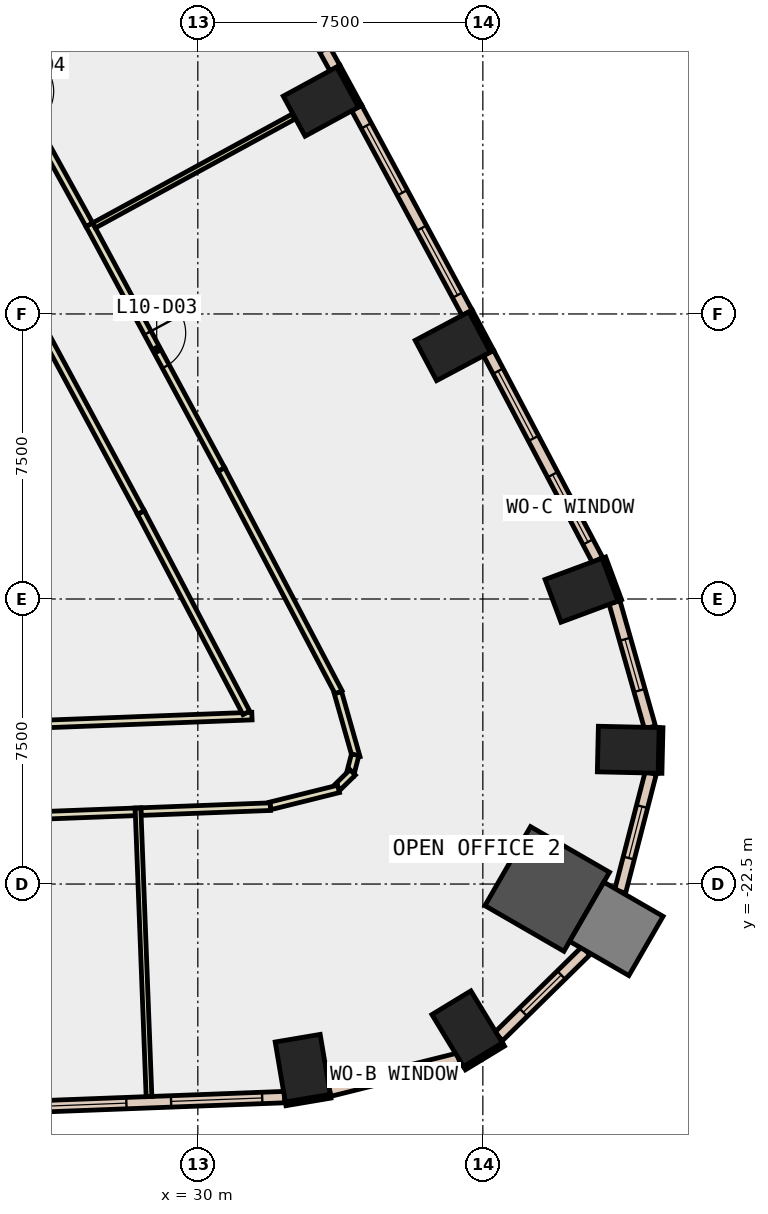
"""IFC4 building model, lengths in metres.
Left out: names, types, materials, properties, quantities, classifications, styles, units other than length and angle.
Written with IfcOpenShell. Run it as: python <this file> out.ifc"""

import sys

from ifc_helpers import new_model, si_unit, direction, frame, frame_2d, origin, origin_2d, place, context, subcontext, project, spatial, rectangle, extrude, element, fill, save


model = new_model("IFC4")
c1 = context("Model", 3, precision=1e-05, world=origin(), true_north=direction((0.0, 1.0)))
c2 = subcontext(c1, "Body", "Model", "MODEL_VIEW")
j1 = project(units=[si_unit("LENGTHUNIT", "METRE"), si_unit("PLANEANGLEUNIT", "RADIAN")], contexts=[c1])
p1 = place(None, origin())
s1 = spatial("IfcSite", under=j1, at=p1, CompositionType="ELEMENT")
p2 = place(p1, origin())
s2 = spatial("IfcBuilding", under=s1, at=p2, CompositionType="ELEMENT")
p3 = place(p2, frame((0.0, 0.0, 51.8)))
s3 = spatial("IfcBuildingStorey", under=s2, at=p3, CompositionType="ELEMENT", Elevation=51.8)
for number, where, z_axis, x_axis in (
    (1, (32.761, -27.345, -0.4), (0.0, 0.0, 1.0), (0.986, 0.167, 0.0)),
    (2, (37.088, -26.307, -0.4), (0.0, 0.0, 1.0), (0.855, 0.519, 0.0)),
):
    element("IfcColumn", number, at=place(p3, frame(where, z_axis=z_axis, x_axis=x_axis)), inside=s3, PredefinedType="COLUMN", context=c2, shape_type="SweptSolid", body=[
        extrude(rectangle(XDim=1.2, YDim=1.6, at=origin_2d()), origin(), (0.0, 0.0, 1.0), 4.2),
    ])
p4 = place(p3, frame((39.194, -22.629, -0.4), z_axis=(0.0, 0.0, 1.0), x_axis=(-0.866025403784, 0.5, 0.0)))
e3 = element("IfcColumn", 3, at=p4, inside=s3, PredefinedType="COLUMN", context=c2, shape_type="SweptSolid", body=[
    extrude(rectangle(XDim=2.4, YDim=2.4, at=origin_2d()), origin(), (0.0, 0.0, 1.0), 4.2),
])
for number, where, z_axis, x_axis in (
    (4, (41.326, -18.966, -0.4), (0.0, 0.0, 1.0), (0.023, 1.0, 0.0)),
    (5, (40.097, -14.77, -0.4), (0.0, 0.0, 1.0), (-0.348, 0.937, 0.0)),
    (6, (36.708, -8.349, -0.4), (0.0, 0.0, 1.0), (-0.469, 0.883, 0.0)),
    (7, (33.238, -1.913, -0.4), (0.0, 0.0, 1.0), (-0.478, 0.878, 0.0)),
):
    element("IfcColumn", number, at=place(p3, frame(where, z_axis=z_axis, x_axis=x_axis)), inside=s3, PredefinedType="COLUMN", context=c2, shape_type="SweptSolid", body=[
        extrude(rectangle(XDim=1.2, YDim=1.6, at=origin_2d()), origin(), (0.0, 0.0, 1.0), 4.2),
    ])
p5 = place(p3, frame((41.013, -23.679, -0.4), z_axis=(0.0, 0.0, 1.0), x_axis=(-0.866025403784, 0.5, 0.0)))
e8 = element("IfcColumn", 8, at=p5, inside=s3, PredefinedType="COLUMN", context=c2, shape_type="SweptSolid", body=[
    extrude(rectangle(XDim=1.8, YDim=1.8, at=origin_2d()), origin(), (0.0, 0.0, 1.0), 4.2),
])
p6 = place(p3, frame((41.103, -15.037, 0.0), z_axis=(0.0, 0.0, 1.0), x_axis=(-0.348268249601, 0.937394914814, 0.0)))
e9 = element("IfcWall", 9, at=p6, inside=s3, PredefinedType="STANDARD", context=c2, shape_type="SweptSolid", body=[
    extrude(rectangle(XDim=1.2, YDim=0.1, at=frame_2d((0.6, 0.0))), origin(), (0.0, 0.0, 1.0), 3.8),
])
p7 = place(p3, frame((37.74, -8.48, 0.0), z_axis=(0.0, 0.0, 1.0), x_axis=(-0.469383408131, 0.882994459876, 0.0)))
e10 = element("IfcWall", 10, at=p7, inside=s3, PredefinedType="STANDARD", context=c2, shape_type="SweptSolid", body=[
    extrude(rectangle(XDim=1.199, YDim=0.1, at=frame_2d((0.6, 0.0))), origin(), (0.0, 0.0, 1.0), 3.8),
])
p8 = place(p3, frame((34.271, -2.034, 0.0), z_axis=(0.0, 0.0, 1.0), x_axis=(-0.478267644701, 0.878214131082, 0.0)))
e11 = element("IfcWall", 11, at=p8, inside=s3, PredefinedType="STANDARD", context=c2, shape_type="SweptSolid", body=[
    extrude(rectangle(XDim=1.2, YDim=0.1, at=frame_2d((0.6, 0.0))), origin(), (0.0, 0.0, 1.0), 3.8),
])
p9 = place(p3, frame((32.311, -28.283, 0.0), z_axis=(0.0, 0.0, 1.0), x_axis=(0.986011774526, 0.166675674579, 0.0)))
e12 = element("IfcWall", 12, at=p9, inside=s3, PredefinedType="STANDARD", context=c2, shape_type="SweptSolid", body=[
    extrude(rectangle(XDim=1.2, YDim=0.1, at=frame_2d((0.6, 0.0))), origin(), (0.0, 0.0, 1.0), 3.8),
])
for number, where, z_axis, x_axis in (
    (13, (37.016, -27.345, 0.0), (0.0, 0.0, 1.0), (0.855, 0.519, 0.0)),
    (14, (42.162, -19.585, 0.0), (0.0, 0.0, 1.0), (0.023, 1.0, 0.0)),
):
    element("IfcWall", number, at=place(p3, frame(where, z_axis=z_axis, x_axis=x_axis)), inside=s3, PredefinedType="STANDARD", context=c2, shape_type="SweptSolid", body=[
        extrude(rectangle(XDim=1.2, YDim=0.1, at=frame_2d((0.6, 0.0))), origin(), (0.0, 0.0, 1.0), 3.8),
    ])
p10 = place(p3, frame((25.134, -28.378, 0.0), z_axis=(0.0, 0.0, 1.0), x_axis=(0.999276920032, 0.038021534562, 0.0)))
e15 = element("IfcWall", 15, at=p10, inside=s3, PredefinedType="STANDARD", context=c2, shape_type="SweptSolid", body=[
    extrude(rectangle(XDim=7.153, YDim=0.3, at=frame_2d((3.577, 0.0))), origin(), (0.0, 0.0, 1.0), 3.8),
])
p11 = place(p10, frame((0.588, 0.0, 0.9)))
e16 = element("IfcOpeningElement", 16, at=p11, cuts=e15, PredefinedType="OPENING", context=c2, shape_type="SweptSolid", body=[
    extrude(rectangle(XDim=2.4, YDim=2.6, at=frame_2d((1.2, 1.3))), frame((0.0, 0.16, 0.0), z_axis=(0.0, -1.0, 0.0), x_axis=(1.0, 0.0, 0.0)), (0.0, 0.0, 1.0), 0.32),
])
p12 = place(p10, frame((4.165, 0.0, 0.9)))
e17 = element("IfcOpeningElement", 17, at=p12, cuts=e15, PredefinedType="OPENING", context=c2, shape_type="SweptSolid", body=[
    extrude(rectangle(XDim=2.4, YDim=2.6, at=frame_2d((1.2, 1.3))), frame((0.0, 0.16, 0.0), z_axis=(0.0, -1.0, 0.0), x_axis=(1.0, 0.0, 0.0)), (0.0, 0.0, 1.0), 0.32),
])
p13 = place(p3, frame((33.469, -27.939, 0.0), z_axis=(0.0, 0.0, 1.0), x_axis=(0.970331016871, 0.241780308749, 0.0)))
e18 = element("IfcWall", 18, at=p13, inside=s3, PredefinedType="STANDARD", context=c2, shape_type="SweptSolid", body=[
    extrude(rectangle(XDim=3.499, YDim=0.3, at=frame_2d((1.75, 0.0))), origin(), (0.0, 0.0, 1.0), 3.8),
])
p14 = place(p13, frame((1.049, 0.0, 0.9)))
e19 = element("IfcOpeningElement", 19, at=p14, cuts=e18, PredefinedType="OPENING", context=c2, shape_type="SweptSolid", body=[
    extrude(rectangle(XDim=1.4, YDim=2.6, at=frame_2d((0.7, 1.3))), frame((0.0, 0.16, 0.0), z_axis=(0.0, -1.0, 0.0), x_axis=(1.0, 0.0, 0.0)), (0.0, 0.0, 1.0), 0.32),
])
p15 = place(p3, frame((37.914, -26.513, 0.0), z_axis=(0.0, 0.0, 1.0), x_axis=(0.71340487189, 0.700752087948, 0.0)))
e20 = element("IfcWall", 20, at=p15, inside=s3, PredefinedType="STANDARD", context=c2, shape_type="SweptSolid", body=[
    extrude(rectangle(XDim=3.222, YDim=0.3, at=frame_2d((1.611, 0.0))), origin(), (0.0, 0.0, 1.0), 3.8),
])
p16 = place(p15, frame((0.911, 0.0, 0.9)))
e21 = element("IfcOpeningElement", 21, at=p16, cuts=e20, PredefinedType="OPENING", context=c2, shape_type="SweptSolid", body=[
    extrude(rectangle(XDim=1.4, YDim=2.6, at=frame_2d((0.7, 1.3))), frame((0.0, 0.16, 0.0), z_axis=(0.0, -1.0, 0.0), x_axis=(1.0, 0.0, 0.0)), (0.0, 0.0, 1.0), 0.32),
])
p17 = place(p3, frame((41.112, -22.698, 0.0), z_axis=(0.0, 0.0, 1.0), x_axis=(0.250086521833, 0.968223492587, 0.0)))
e22 = element("IfcWall", 22, at=p17, inside=s3, PredefinedType="STANDARD", context=c2, shape_type="SweptSolid", body=[
    extrude(rectangle(XDim=3.222, YDim=0.3, at=frame_2d((1.611, 0.0))), origin(), (0.0, 0.0, 1.0), 3.8),
])
p18 = place(p17, frame((0.911, 0.0, 0.9)))
e23 = element("IfcOpeningElement", 23, at=p18, cuts=e22, PredefinedType="OPENING", context=c2, shape_type="SweptSolid", body=[
    extrude(rectangle(XDim=1.4, YDim=2.6, at=frame_2d((0.7, 1.3))), frame((0.0, 0.16, 0.0), z_axis=(0.0, -1.0, 0.0), x_axis=(1.0, 0.0, 0.0)), (0.0, 0.0, 1.0), 0.32),
])
p19 = place(p3, frame((41.898, -18.379, 0.0), z_axis=(0.0, 0.0, 1.0), x_axis=(-0.272901963142, 0.962041848629, 0.0)))
e24 = element("IfcWall", 24, at=p19, inside=s3, PredefinedType="STANDARD", context=c2, shape_type="SweptSolid", body=[
    extrude(rectangle(XDim=3.422, YDim=0.3, at=frame_2d((1.711, 0.0))), origin(), (0.0, 0.0, 1.0), 3.8),
])
p20 = place(p19, frame((1.011, 0.0, 0.9)))
e25 = element("IfcOpeningElement", 25, at=p20, cuts=e24, PredefinedType="OPENING", context=c2, shape_type="SweptSolid", body=[
    extrude(rectangle(XDim=1.4, YDim=2.6, at=frame_2d((0.7, 1.3))), frame((0.0, 0.16, 0.0), z_axis=(0.0, -1.0, 0.0), x_axis=(1.0, 0.0, 0.0)), (0.0, 0.0, 1.0), 0.32),
])
p21 = place(p3, frame((40.518, -13.975, 0.0), z_axis=(0.0, 0.0, 1.0), x_axis=(-0.465847756605, 0.884864886673, 0.0)))
e26 = element("IfcWall", 26, at=p21, inside=s3, PredefinedType="STANDARD", context=c2, shape_type="SweptSolid", body=[
    extrude(rectangle(XDim=6.157, YDim=0.3, at=frame_2d((3.079, 0.0))), origin(), (0.0, 0.0, 1.0), 3.8),
])
p22 = place(p21, frame((0.539, 0.0, 0.9)))
e27 = element("IfcOpeningElement", 27, at=p22, cuts=e26, PredefinedType="OPENING", context=c2, shape_type="SweptSolid", body=[
    extrude(rectangle(XDim=2.0, YDim=2.6, at=frame_2d((1.0, 1.3))), frame((0.0, 0.16, 0.0), z_axis=(0.0, -1.0, 0.0), x_axis=(1.0, 0.0, 0.0)), (0.0, 0.0, 1.0), 0.32),
])
p23 = place(p21, frame((3.618, 0.0, 0.9)))
e28 = element("IfcOpeningElement", 28, at=p23, cuts=e26, PredefinedType="OPENING", context=c2, shape_type="SweptSolid", body=[
    extrude(rectangle(XDim=2.0, YDim=2.6, at=frame_2d((1.0, 1.3))), frame((0.0, 0.16, 0.0), z_axis=(0.0, -1.0, 0.0), x_axis=(1.0, 0.0, 0.0)), (0.0, 0.0, 1.0), 0.32),
])
p24 = place(p3, frame((37.086, -7.47, 0.0), z_axis=(0.0, 0.0, 1.0), x_axis=(-0.474584950749, 0.880209704856, 0.0)))
e29 = element("IfcWall", 29, at=p24, inside=s3, PredefinedType="STANDARD", context=c2, shape_type="SweptSolid", body=[
    extrude(rectangle(XDim=6.121, YDim=0.3, at=frame_2d((3.061, 0.0))), origin(), (0.0, 0.0, 1.0), 3.8),
])
p25 = place(p24, frame((0.53, 0.0, 0.9)))
e30 = element("IfcOpeningElement", 30, at=p25, cuts=e29, PredefinedType="OPENING", context=c2, shape_type="SweptSolid", body=[
    extrude(rectangle(XDim=2.0, YDim=2.6, at=frame_2d((1.0, 1.3))), frame((0.0, 0.16, 0.0), z_axis=(0.0, -1.0, 0.0), x_axis=(1.0, 0.0, 0.0)), (0.0, 0.0, 1.0), 0.32),
])
p26 = place(p24, frame((3.591, 0.0, 0.9)))
e31 = element("IfcOpeningElement", 31, at=p26, cuts=e29, PredefinedType="OPENING", context=c2, shape_type="SweptSolid", body=[
    extrude(rectangle(XDim=2.0, YDim=2.6, at=frame_2d((1.0, 1.3))), frame((0.0, 0.16, 0.0), z_axis=(0.0, -1.0, 0.0), x_axis=(1.0, 0.0, 0.0)), (0.0, 0.0, 1.0), 0.32),
])
p27 = place(p3, frame((33.607, -1.03, 0.0), z_axis=(0.0, 0.0, 1.0), x_axis=(-0.483195456594, 0.875512507465, 0.0)))
e32 = element("IfcWall", 32, at=p27, inside=s3, PredefinedType="STANDARD", context=c2, shape_type="SweptSolid", body=[
    extrude(rectangle(XDim=6.12, YDim=0.3, at=frame_2d((3.06, 0.0))), origin(), (0.0, 0.0, 1.0), 3.8),
])
p28 = place(p27, frame((0.53, 0.0, 0.9)))
e33 = element("IfcOpeningElement", 33, at=p28, cuts=e32, PredefinedType="OPENING", context=c2, shape_type="SweptSolid", body=[
    extrude(rectangle(XDim=2.0, YDim=2.6, at=frame_2d((1.0, 1.3))), frame((0.0, 0.16, 0.0), z_axis=(0.0, -1.0, 0.0), x_axis=(1.0, 0.0, 0.0)), (0.0, 0.0, 1.0), 0.32),
])
p29 = place(p27, frame((3.59, 0.0, 0.9)))
e34 = element("IfcOpeningElement", 34, at=p29, cuts=e32, PredefinedType="OPENING", context=c2, shape_type="SweptSolid", body=[
    extrude(rectangle(XDim=2.0, YDim=2.6, at=frame_2d((1.0, 1.3))), frame((0.0, 0.16, 0.0), z_axis=(0.0, -1.0, 0.0), x_axis=(1.0, 0.0, 0.0)), (0.0, 0.0, 1.0), 0.32),
])
p30 = place(p3, frame((24.208, -18.356, 0.0), z_axis=(0.0, 0.0, 1.0), x_axis=(0.999275140761, 0.03806826838, 0.0)))
e35 = element("IfcWall", 35, at=p30, inside=s3, PredefinedType="PARTITIONING", context=c2, shape_type="SweptSolid", body=[
    extrude(rectangle(XDim=7.221, YDim=0.2, at=frame_2d((3.611, 0.0))), origin(), (0.0, 0.0, 1.0), 3.8),
])
p31 = place(p3, frame((31.277, -17.997, 0.0), z_axis=(0.0, 0.0, 1.0), x_axis=(-0.465862938277, 0.884856893933, 0.0)))
e36 = element("IfcWall", 36, at=p31, inside=s3, PredefinedType="PARTITIONING", context=c2, shape_type="SweptSolid", body=[
    extrude(rectangle(XDim=5.959, YDim=0.2, at=frame_2d((2.979, 0.0))), origin(), (0.0, 0.0, 1.0), 3.8),
])
p32 = place(p3, frame((28.501, -12.724, 0.0), z_axis=(0.0, 0.0, 1.0), x_axis=(-0.474575559827, 0.880214768119, 0.0)))
e37 = element("IfcWall", 37, at=p32, inside=s3, PredefinedType="PARTITIONING", context=c2, shape_type="SweptSolid", body=[
    extrude(rectangle(XDim=7.221, YDim=0.2, at=frame_2d((3.611, 0.0))), origin(), (0.0, 0.0, 1.0), 3.8),
])
p33 = place(p3, frame((28.354, -20.6, 0.0), z_axis=(0.0, 0.0, 1.0), x_axis=(-0.999276945714, -0.038020859604, 0.0)))
e38 = element("IfcWall", 38, at=p33, inside=s3, PredefinedType="PARTITIONING", context=c2, shape_type="SweptSolid", body=[
    extrude(rectangle(XDim=4.071, YDim=0.2, at=frame_2d((2.036, 0.0))), origin(), (0.0, 0.0, 1.0), 3.8),
])
p34 = place(p3, frame((27.145, -5.152, 0.0), z_axis=(0.0, 0.0, 1.0), x_axis=(0.474591029089, -0.880206427554, 0.0)))
e39 = element("IfcWall", 39, at=p34, inside=s3, PredefinedType="PARTITIONING", context=c2, shape_type="SweptSolid", body=[
    extrude(rectangle(XDim=7.32, YDim=0.2, at=frame_2d((3.66, 0.0))), origin(), (0.0, 0.0, 1.0), 3.8),
])
p35 = place(p34, frame((3.235, 0.0, 0.0)))
e40 = element("IfcOpeningElement", 40, at=p35, cuts=e39, PredefinedType="OPENING", context=c2, shape_type="SweptSolid", body=[
    extrude(rectangle(XDim=1.0, YDim=2.1, at=frame_2d((0.5, 1.05))), frame((0.0, 0.11, 0.0), z_axis=(0.0, -1.0, 0.0), x_axis=(1.0, 0.0, 0.0)), (0.0, 0.0, 1.0), 0.22),
])
p36 = place(p3, frame((30.619, -11.595, 0.0), z_axis=(0.0, 0.0, 1.0), x_axis=(0.465905874098, -0.884834287582, 0.0)))
e41 = element("IfcWall", 41, at=p36, inside=s3, PredefinedType="PARTITIONING", context=c2, shape_type="SweptSolid", body=[
    extrude(rectangle(XDim=6.626, YDim=0.2, at=frame_2d((3.313, 0.0))), origin(), (0.0, 0.0, 1.0), 3.8),
])
p37 = place(p3, frame((33.687, -17.466, 0.0), z_axis=(0.0, 0.0, 1.0), x_axis=(0.272780480932, -0.962076301144, 0.0)))
e42 = element("IfcWall", 42, at=p37, inside=s3, PredefinedType="PARTITIONING", context=c2, shape_type="SweptSolid", body=[
    extrude(rectangle(XDim=1.778, YDim=0.2, at=frame_2d((0.889, 0.0))), origin(), (0.0, 0.0, 1.0), 3.8),
])
p38 = place(p3, frame((34.14, -19.099, 0.0), z_axis=(0.0, 0.0, 1.0), x_axis=(-0.249326881699, -0.968419385423, 0.0)))
e43 = element("IfcWall", 43, at=p38, inside=s3, PredefinedType="PARTITIONING", context=c2, shape_type="SweptSolid", body=[
    extrude(rectangle(XDim=0.549, YDim=0.2, at=frame_2d((0.275, 0.0))), origin(), (0.0, 0.0, 1.0), 3.8),
])
p39 = place(p3, frame((34.074, -19.562, 0.0), z_axis=(0.0, 0.0, 1.0), x_axis=(-0.713456013967, -0.700700018649, 0.0)))
e44 = element("IfcWall", 44, at=p39, inside=s3, PredefinedType="PARTITIONING", context=c2, shape_type="SweptSolid", body=[
    extrude(rectangle(XDim=0.555, YDim=0.2, at=frame_2d((0.277, 0.0))), origin(), (0.0, 0.0, 1.0), 3.8),
])
p40 = place(p3, frame((33.703, -19.997, 0.0), z_axis=(0.0, 0.0, 1.0), x_axis=(-0.970421070494, -0.241418611423, 0.0)))
e45 = element("IfcWall", 45, at=p40, inside=s3, PredefinedType="PARTITIONING", context=c2, shape_type="SweptSolid", body=[
    extrude(rectangle(XDim=1.852, YDim=0.2, at=frame_2d((0.926, 0.0))), origin(), (0.0, 0.0, 1.0), 3.8),
])
p41 = place(p3, frame((31.909, -20.464, 0.0), z_axis=(0.0, 0.0, 1.0), x_axis=(-0.999273295147, -0.038116684091, 0.0)))
e46 = element("IfcWall", 46, at=p41, inside=s3, PredefinedType="PARTITIONING", context=c2, shape_type="SweptSolid", body=[
    extrude(rectangle(XDim=3.407, YDim=0.2, at=frame_2d((1.704, 0.0))), origin(), (0.0, 0.0, 1.0), 3.8),
])
p42 = place(p3, frame((23.681, 1.124, 0.0), z_axis=(0.0, 0.0, 1.0), x_axis=(0.483125061868, -0.875551354631, 0.0)))
e47 = element("IfcWall", 47, at=p42, inside=s3, PredefinedType="PARTITIONING", context=c2, shape_type="SweptSolid", body=[
    extrude(rectangle(XDim=7.168, YDim=0.2, at=frame_2d((3.584, 0.0))), origin(), (0.0, 0.0, 1.0), 3.8),
])
p43 = place(p42, frame((3.159, 0.0, 0.0)))
e48 = element("IfcOpeningElement", 48, at=p43, cuts=e47, PredefinedType="OPENING", context=c2, shape_type="SweptSolid", body=[
    extrude(rectangle(XDim=1.0, YDim=2.1, at=frame_2d((0.5, 1.05))), frame((0.0, 0.11, 0.0), z_axis=(0.0, -1.0, 0.0), x_axis=(1.0, 0.0, 0.0)), (0.0, 0.0, 1.0), 0.22),
])
p44 = place(p3, frame((28.425, -20.497, 0.0), z_axis=(0.0, 0.0, 1.0), x_axis=(0.03816049016, -0.999271623229, 0.0)))
e49 = element("IfcWall", 49, at=p44, inside=s3, PredefinedType="PARTITIONING", context=c2, shape_type="SweptSolid", body=[
    extrude(rectangle(XDim=7.601, YDim=0.15, at=frame_2d((3.8, 0.0))), origin(), (0.0, 0.0, 1.0), 3.8),
])
p45 = place(p3, frame((27.268, -5.171, 0.0), z_axis=(0.0, 0.0, 1.0), x_axis=(0.877837854343, 0.478957932895, 0.0)))
e50 = element("IfcWall", 50, at=p45, inside=s3, PredefinedType="PARTITIONING", context=c2, shape_type="SweptSolid", body=[
    extrude(rectangle(XDim=5.982, YDim=0.15, at=frame_2d((2.991, 0.0))), origin(), (0.0, 0.0, 1.0), 3.8),
])
p46 = place(p11, origin())
e51 = element("IfcWindow", 51, at=p46, inside=s3, PartitioningType="SINGLE_PANEL", PredefinedType="WINDOW", context=c2, shape_type="SweptSolid", body=[
    extrude(rectangle(XDim=2.4, YDim=2.6, at=frame_2d((1.2, 1.3))), frame((0.0, 0.03, 0.0), z_axis=(0.0, -1.0, 0.0), x_axis=(1.0, 0.0, 0.0)), (0.0, 0.0, 1.0), 0.06),
])
fill(e16, e51)
p47 = place(p12, origin())
e52 = element("IfcWindow", 52, at=p47, inside=s3, PartitioningType="SINGLE_PANEL", PredefinedType="WINDOW", context=c2, shape_type="SweptSolid", body=[
    extrude(rectangle(XDim=2.4, YDim=2.6, at=frame_2d((1.2, 1.3))), frame((0.0, 0.03, 0.0), z_axis=(0.0, -1.0, 0.0), x_axis=(1.0, 0.0, 0.0)), (0.0, 0.0, 1.0), 0.06),
])
fill(e17, e52)
p48 = place(p14, origin())
e53 = element("IfcWindow", 53, at=p48, inside=s3, PartitioningType="SINGLE_PANEL", PredefinedType="WINDOW", context=c2, shape_type="SweptSolid", body=[
    extrude(rectangle(XDim=1.4, YDim=2.6, at=frame_2d((0.7, 1.3))), frame((0.0, 0.03, 0.0), z_axis=(0.0, -1.0, 0.0), x_axis=(1.0, 0.0, 0.0)), (0.0, 0.0, 1.0), 0.06),
])
fill(e19, e53)
p49 = place(p16, origin())
e54 = element("IfcWindow", 54, at=p49, inside=s3, PartitioningType="SINGLE_PANEL", PredefinedType="WINDOW", context=c2, shape_type="SweptSolid", body=[
    extrude(rectangle(XDim=1.4, YDim=2.6, at=frame_2d((0.7, 1.3))), frame((0.0, 0.03, 0.0), z_axis=(0.0, -1.0, 0.0), x_axis=(1.0, 0.0, 0.0)), (0.0, 0.0, 1.0), 0.06),
])
fill(e21, e54)
p50 = place(p18, origin())
e55 = element("IfcWindow", 55, at=p50, inside=s3, PartitioningType="SINGLE_PANEL", PredefinedType="WINDOW", context=c2, shape_type="SweptSolid", body=[
    extrude(rectangle(XDim=1.4, YDim=2.6, at=frame_2d((0.7, 1.3))), frame((0.0, 0.03, 0.0), z_axis=(0.0, -1.0, 0.0), x_axis=(1.0, 0.0, 0.0)), (0.0, 0.0, 1.0), 0.06),
])
fill(e23, e55)
p51 = place(p20, origin())
e56 = element("IfcWindow", 56, at=p51, inside=s3, PartitioningType="SINGLE_PANEL", PredefinedType="WINDOW", context=c2, shape_type="SweptSolid", body=[
    extrude(rectangle(XDim=1.4, YDim=2.6, at=frame_2d((0.7, 1.3))), frame((0.0, 0.03, 0.0), z_axis=(0.0, -1.0, 0.0), x_axis=(1.0, 0.0, 0.0)), (0.0, 0.0, 1.0), 0.06),
])
fill(e25, e56)
p52 = place(p22, origin())
e57 = element("IfcWindow", 57, at=p52, inside=s3, PartitioningType="SINGLE_PANEL", PredefinedType="WINDOW", context=c2, shape_type="SweptSolid", body=[
    extrude(rectangle(XDim=2.0, YDim=2.6, at=frame_2d((1.0, 1.3))), frame((0.0, 0.03, 0.0), z_axis=(0.0, -1.0, 0.0), x_axis=(1.0, 0.0, 0.0)), (0.0, 0.0, 1.0), 0.06),
])
fill(e27, e57)
p53 = place(p23, origin())
e58 = element("IfcWindow", 58, at=p53, inside=s3, PartitioningType="SINGLE_PANEL", PredefinedType="WINDOW", context=c2, shape_type="SweptSolid", body=[
    extrude(rectangle(XDim=2.0, YDim=2.6, at=frame_2d((1.0, 1.3))), frame((0.0, 0.03, 0.0), z_axis=(0.0, -1.0, 0.0), x_axis=(1.0, 0.0, 0.0)), (0.0, 0.0, 1.0), 0.06),
])
fill(e28, e58)
p54 = place(p25, origin())
e59 = element("IfcWindow", 59, at=p54, inside=s3, PartitioningType="SINGLE_PANEL", PredefinedType="WINDOW", context=c2, shape_type="SweptSolid", body=[
    extrude(rectangle(XDim=2.0, YDim=2.6, at=frame_2d((1.0, 1.3))), frame((0.0, 0.03, 0.0), z_axis=(0.0, -1.0, 0.0), x_axis=(1.0, 0.0, 0.0)), (0.0, 0.0, 1.0), 0.06),
])
fill(e30, e59)
p55 = place(p26, origin())
e60 = element("IfcWindow", 60, at=p55, inside=s3, PartitioningType="SINGLE_PANEL", PredefinedType="WINDOW", context=c2, shape_type="SweptSolid", body=[
    extrude(rectangle(XDim=2.0, YDim=2.6, at=frame_2d((1.0, 1.3))), frame((0.0, 0.03, 0.0), z_axis=(0.0, -1.0, 0.0), x_axis=(1.0, 0.0, 0.0)), (0.0, 0.0, 1.0), 0.06),
])
fill(e31, e60)
p56 = place(p35, origin())
e61 = element("IfcDoor", 61, at=p56, inside=s3, OperationType="SINGLE_SWING_RIGHT", PredefinedType="DOOR", context=c2, shape_type="SweptSolid", body=[
    extrude(rectangle(XDim=1.0, YDim=2.1, at=frame_2d((0.5, 1.05))), frame((0.0, 0.025, 0.0), z_axis=(0.0, -1.0, 0.0), x_axis=(1.0, 0.0, 0.0)), (0.0, 0.0, 1.0), 0.05),
])
fill(e40, e61)
save(model, sys.argv[1])
